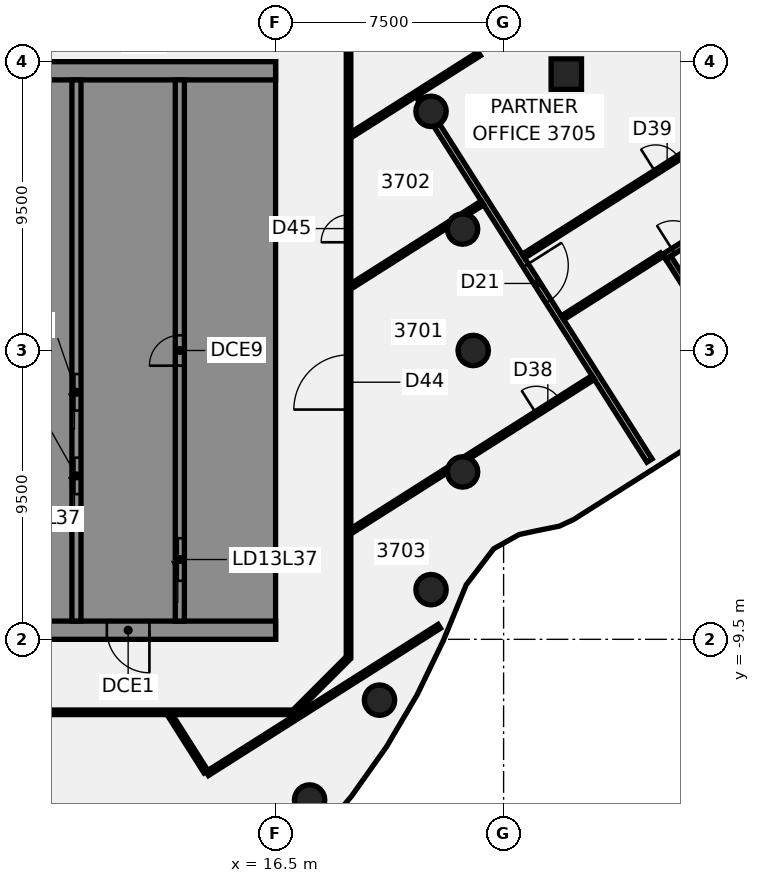
"""IFC4 building model, lengths in metres.
Left out: names, types, materials, properties, quantities, classifications, styles, units other than length and angle.
Written with IfcOpenShell. Run it as: python <this file> out.ifc"""

import sys

from ifc_helpers import new_model, si_unit, direction, frame, frame_2d, origin, origin_2d, place, context, subcontext, project, spatial, polyline, rectangle, circle, outline, extrude, element, fill, save


model = new_model("IFC4")
c1 = context("Model", 3, precision=1e-05, world=origin(), true_north=direction((0.0, 1.0)))
c2 = subcontext(c1, "Body", "Model", "MODEL_VIEW")
j1 = project(units=[si_unit("LENGTHUNIT", "METRE"), si_unit("PLANEANGLEUNIT", "RADIAN")], contexts=[c1])
p1 = place(None, origin())
s1 = spatial("IfcSite", under=j1, at=p1, CompositionType="ELEMENT")
p2 = place(p1, origin())
s2 = spatial("IfcBuilding", under=s1, at=p2, CompositionType="ELEMENT")
p3 = place(p2, frame((0.0, 0.0, 151.75)))
s3 = spatial("IfcBuildingStorey", under=s2, at=p3, CompositionType="ELEMENT", Elevation=151.75)
for number, where, z_axis, x_axis in (
    (1, (23.0, 0.0, -0.14), (0.0, 0.0, 1.0), (1.0, 0.0, 0.0)),
    (2, (22.651, 3.994, -0.14), (0.0, 0.0, 1.0), (1.0, 0.0, 0.0)),
    (3, (21.613, 7.866, -0.14), (0.0, 0.0, 1.0), (1.0, 0.0, 0.0)),
    (4, (17.619, -14.784, -0.14), (0.0, 0.0, 1.0), (1.0, 0.0, 0.0)),
    (5, (19.919, -11.5, -0.14), (0.0, 0.0, 1.0), (1.0, 0.0, 0.0)),
    (6, (21.613, -7.866, -0.14), (0.0, 0.0, 1.0), (1.0, 0.0, 0.0)),
    (7, (22.651, -3.994, -0.14), (0.0, 0.0, 1.0), (1.0, 0.0, 0.0)),
):
    element("IfcColumn", number, at=place(p3, frame(where, z_axis=z_axis, x_axis=x_axis)), inside=s3, PredefinedType="COLUMN", context=c2, shape_type="SweptSolid", body=[
        extrude(circle(Radius=0.5, at=origin_2d()), origin(), (0.0, 0.0, 1.0), 3.75),
    ])
p4 = place(p3, frame((26.062, 9.09, -0.139), z_axis=(-0.044315827662, 0.01932716713, 0.998830600267), x_axis=(0.534702759857, -0.84409029995, 0.04005651173)))
e8 = element("IfcColumn", 8, at=p4, inside=s3, PredefinedType="COLUMN", context=c2, shape_type="SweptSolid", body=[
    extrude(rectangle(XDim=1.0, YDim=1.0, at=origin_2d()), origin(), (0.0, 0.0, 1.0), 3.752),
])
p5 = place(p3, frame((2.655, -11.997, 0.0), z_axis=(0.0, 0.0, 1.0), x_axis=(0.53566721482, -0.844429176999, 0.0)))
e9 = element("IfcWall", 9, at=p5, inside=s3, PredefinedType="PARTITIONING", context=c2, shape_type="SweptSolid", body=[
    extrude(rectangle(XDim=13.263, YDim=0.15, at=frame_2d((6.632, 0.0))), origin(), (0.0, 0.0, 1.0), 3.01),
])
p6 = place(p3, frame((13.031, -11.997, 0.0), z_axis=(0.0, 0.0, 1.0), x_axis=(0.535487935778, -0.84454287673, 0.0)))
e10 = element("IfcWall", 10, at=p6, inside=s3, PredefinedType="PARTITIONING", context=c2, shape_type="SweptSolid", body=[
    extrude(rectangle(XDim=2.198, YDim=0.15, at=frame_2d((1.099, 0.0))), origin(), (0.0, 0.0, 1.0), 3.01),
])
p7 = place(p3, frame((21.178, 8.39, 0.0), z_axis=(0.0, 0.0, 1.0), x_axis=(0.535205480582, -0.844721903087, 0.0)))
e11 = element("IfcWall", 11, at=p7, inside=s3, PredefinedType="PARTITIONING", context=c2, shape_type="SweptSolid", body=[
    extrude(rectangle(XDim=0.189, YDim=0.15, at=frame_2d((0.095, 0.0))), origin(), (0.0, 0.0, 1.0), 3.01),
])
p8 = place(p3, frame((21.802, 7.407, 0.0), z_axis=(0.0, 0.0, 1.0), x_axis=(0.535767031035, -0.844365849888, 0.0)))
e12 = element("IfcWall", 12, at=p8, inside=s3, PredefinedType="PARTITIONING", context=c2, shape_type="SweptSolid", body=[
    extrude(rectangle(XDim=13.06, YDim=0.2, at=frame_2d((6.53, 0.0))), origin(), (0.0, 0.0, 1.0), 3.01),
])
p9 = place(p8, frame((5.461, 0.0, 0.0)))
e13 = element("IfcOpeningElement", 13, at=p9, cuts=e12, PredefinedType="OPENING", context=c2, shape_type="SweptSolid", body=[
    extrude(rectangle(XDim=1.4, YDim=2.1, at=frame_2d((0.7, 1.05))), frame((0.0, 0.11, 0.0), z_axis=(0.0, -1.0, 0.0), x_axis=(1.0, 0.0, 0.0)), (0.0, 0.0, 1.0), 0.22),
])
p10 = place(p3, frame((29.206, 12.536, 0.0), z_axis=(0.0, 0.0, 1.0), x_axis=(0.535715752524, -0.844398384945, 0.0)))
e14 = element("IfcWall", 14, at=p10, inside=s3, PredefinedType="PARTITIONING", context=c2, shape_type="SweptSolid", body=[
    extrude(rectangle(XDim=5.451, YDim=0.1, at=frame_2d((2.726, 0.0))), origin(), (0.0, 0.0, 1.0), 3.01),
])
p11 = place(p3, frame((-17.1, -11.9, 0.0), z_axis=(0.0, 0.0, 1.0), x_axis=(1.0, 0.0, 0.0)))
e15 = element("IfcWall", 15, at=p11, inside=s3, PredefinedType="PARTITIONING", context=c2, shape_type="SweptSolid", body=[
    extrude(rectangle(XDim=34.165, YDim=0.15, at=frame_2d((17.083, 0.0))), origin(), (0.0, 0.0, 1.0), 3.01),
])
p12 = place(p11, frame((9.886, 0.0, 0.0)))
e16 = element("IfcOpeningElement", 16, at=p12, cuts=e15, PredefinedType="OPENING", context=c2, shape_type="SweptSolid", body=[
    extrude(rectangle(XDim=1.8, YDim=2.1, at=frame_2d((0.9, 1.05))), frame((0.0, 0.085, 0.0), z_axis=(0.0, -1.0, 0.0), x_axis=(1.0, 0.0, 0.0)), (0.0, 0.0, 1.0), 0.17),
])
p13 = place(p11, frame((1.95, 0.0, 0.0)))
e17 = element("IfcOpeningElement", 17, at=p13, cuts=e15, PredefinedType="OPENING", context=c2, shape_type="SweptSolid", body=[
    extrude(rectangle(XDim=1.8, YDim=2.1, at=frame_2d((0.9, 1.05))), frame((0.0, 0.085, 0.0), z_axis=(0.0, -1.0, 0.0), x_axis=(1.0, 0.0, 0.0)), (0.0, 0.0, 1.0), 0.17),
])
p14 = place(p11, frame((24.043, 0.0, 0.0)))
e18 = element("IfcOpeningElement", 18, at=p14, cuts=e15, PredefinedType="OPENING", context=c2, shape_type="SweptSolid", body=[
    extrude(rectangle(XDim=1.8, YDim=2.1, at=frame_2d((0.9, 1.05))), frame((0.0, 0.085, 0.0), z_axis=(0.0, -1.0, 0.0), x_axis=(1.0, 0.0, 0.0)), (0.0, 0.0, 1.0), 0.17),
])
p15 = place(p3, frame((14.249, -13.917, 0.0), z_axis=(0.0, 0.0, 1.0), x_axis=(0.844422195246, 0.535678220741, 0.0)))
e19 = element("IfcWall", 19, at=p15, inside=s3, PredefinedType="PARTITIONING", context=c2, shape_type="SweptSolid", body=[
    extrude(rectangle(XDim=9.042, YDim=0.15, at=frame_2d((4.521, 0.0))), origin(), (0.0, 0.0, 1.0), 3.01),
])
p16 = place(p3, frame((18.997, -5.931, 0.0), z_axis=(0.0, 0.0, 1.0), x_axis=(0.844425849741, 0.535672459894, 0.0)))
e20 = element("IfcWall", 20, at=p16, inside=s3, PredefinedType="PARTITIONING", context=c2, shape_type="SweptSolid", body=[
    extrude(rectangle(XDim=3.744, YDim=0.15, at=frame_2d((1.872, 0.0))), origin(), (0.0, 0.0, 1.0), 3.01),
])
p17 = place(p3, frame((22.795, -3.522, 0.0), z_axis=(0.0, 0.0, 1.0), x_axis=(0.844458169001, 0.535621508911, 0.0)))
e21 = element("IfcWall", 21, at=p17, inside=s3, PredefinedType="PARTITIONING", context=c2, shape_type="SweptSolid", body=[
    extrude(rectangle(XDim=4.916, YDim=0.15, at=frame_2d((2.458, 0.0))), origin(), (0.0, 0.0, 1.0), 3.01),
])
p18 = place(p17, frame((2.7, 0.0, 0.0)))
e22 = element("IfcOpeningElement", 22, at=p18, cuts=e21, PredefinedType="OPENING", context=c2, shape_type="SweptSolid", body=[
    extrude(rectangle(XDim=0.9, YDim=2.1, at=frame_2d((0.45, 1.05))), frame((0.0, 0.085, 0.0), z_axis=(0.0, -1.0, 0.0), x_axis=(1.0, 0.0, 0.0)), (0.0, 0.0, 1.0), 0.17),
])
p19 = place(p3, frame((18.997, 2.122, 0.0), z_axis=(0.0, 0.0, 1.0), x_axis=(0.844431403995, 0.535663704153, 0.0)))
e23 = element("IfcWall", 23, at=p19, inside=s3, PredefinedType="PARTITIONING", context=c2, shape_type="SweptSolid", body=[
    extrude(rectangle(XDim=3.769, YDim=0.15, at=frame_2d((1.885, 0.0))), origin(), (0.0, 0.0, 1.0), 3.01),
])
p20 = place(p3, frame((22.722, 4.485, 0.0), z_axis=(0.0, 0.0, 1.0), x_axis=(0.844332505382, 0.535819578174, 0.0)))
e24 = element("IfcWall", 24, at=p20, inside=s3, PredefinedType="PARTITIONING", context=c2, shape_type="SweptSolid", body=[
    extrude(rectangle(XDim=0.688, YDim=0.15, at=frame_2d((0.344, 0.0))), origin(), (0.0, 0.0, 1.0), 3.01),
])
p21 = place(p3, frame((18.997, 7.096, 0.0), z_axis=(0.0, 0.0, 1.0), x_axis=(0.844555681742, 0.535467739866, 0.0)))
e25 = element("IfcWall", 25, at=p21, inside=s3, PredefinedType="PARTITIONING", context=c2, shape_type="SweptSolid", body=[
    extrude(rectangle(XDim=4.974, YDim=0.15, at=frame_2d((2.487, 0.0))), origin(), (0.0, 0.0, 1.0), 3.01),
])
p22 = place(p3, frame((24.655, 3.105, 0.0), z_axis=(0.0, 0.0, 1.0), x_axis=(0.844430868609, 0.535664548146, 0.0)))
e26 = element("IfcWall", 26, at=p22, inside=s3, PredefinedType="PARTITIONING", context=c2, shape_type="SweptSolid", body=[
    extrude(rectangle(XDim=17.815, YDim=0.15, at=frame_2d((8.908, 0.0))), origin(), (0.0, 0.0, 1.0), 3.01),
])
p23 = place(p22, frame((5.145, 0.0, 0.0)))
e27 = element("IfcOpeningElement", 27, at=p23, cuts=e26, PredefinedType="OPENING", context=c2, shape_type="SweptSolid", body=[
    extrude(rectangle(XDim=0.9, YDim=2.1, at=frame_2d((0.45, 1.05))), frame((0.0, 0.085, 0.0), z_axis=(0.0, -1.0, 0.0), x_axis=(1.0, 0.0, 0.0)), (0.0, 0.0, 1.0), 0.17),
])
p24 = place(p22, frame((11.745, 0.0, 0.0)))
e28 = element("IfcOpeningElement", 28, at=p24, cuts=e26, PredefinedType="OPENING", context=c2, shape_type="SweptSolid", body=[
    extrude(rectangle(XDim=0.9, YDim=2.1, at=frame_2d((0.45, 1.05))), frame((0.0, 0.085, 0.0), z_axis=(0.0, -1.0, 0.0), x_axis=(1.0, 0.0, 0.0)), (0.0, 0.0, 1.0), 0.17),
])
p25 = place(p3, frame((25.941, 1.078, 0.0), z_axis=(0.0, 0.0, 1.0), x_axis=(0.844417032773, 0.535686358575, 0.0)))
e29 = element("IfcWall", 29, at=p25, inside=s3, PredefinedType="PARTITIONING", context=c2, shape_type="SweptSolid", body=[
    extrude(rectangle(XDim=3.854, YDim=0.15, at=frame_2d((1.927, 0.0))), origin(), (0.0, 0.0, 1.0), 3.01),
])
p26 = place(p3, frame((17.1, -11.9, 0.0), z_axis=(0.0, 0.0, 1.0), x_axis=(0.707106781187, 0.707106781187, 0.0)))
e30 = element("IfcWall", 30, at=p26, inside=s3, PredefinedType="PARTITIONING", context=c2, shape_type="SweptSolid", body=[
    extrude(rectangle(XDim=2.505, YDim=0.15, at=frame_2d((1.253, 0.0))), origin(), (0.0, 0.0, 1.0), 3.01),
])
p27 = place(p3, frame((18.9, -10.1, 0.0), z_axis=(0.0, 0.0, 1.0), x_axis=(0.0, 1.0, 0.0)))
e31 = element("IfcWall", 31, at=p27, inside=s3, PredefinedType="PARTITIONING", context=c2, shape_type="SweptSolid", body=[
    extrude(rectangle(XDim=20.2, YDim=0.15, at=frame_2d((10.1, 0.0))), origin(), (0.0, 0.0, 1.0), 3.01),
])
p28 = place(p27, frame((8.157, 0.0, 0.0)))
e32 = element("IfcOpeningElement", 32, at=p28, cuts=e31, PredefinedType="OPENING", context=c2, shape_type="SweptSolid", body=[
    extrude(rectangle(XDim=1.8, YDim=2.1, at=frame_2d((0.9, 1.05))), frame((0.0, 0.085, 0.0), z_axis=(0.0, -1.0, 0.0), x_axis=(1.0, 0.0, 0.0)), (0.0, 0.0, 1.0), 0.17),
])
p29 = place(p27, frame((13.66, 0.0, 0.0)))
e33 = element("IfcOpeningElement", 33, at=p29, cuts=e31, PredefinedType="OPENING", context=c2, shape_type="SweptSolid", body=[
    extrude(rectangle(XDim=0.9, YDim=2.1, at=frame_2d((0.45, 1.05))), frame((0.0, 0.085, 0.0), z_axis=(0.0, -1.0, 0.0), x_axis=(1.0, 0.0, 0.0)), (0.0, 0.0, 1.0), 0.17),
])
p30 = place(p3, frame((16.5, -9.2, 0.0), z_axis=(0.0, 0.0, 1.0), x_axis=(-1.0, 0.0, 0.0)))
e34 = element("IfcWall", 34, at=p30, inside=s3, PredefinedType="SHEAR", context=c2, shape_type="SweptSolid", body=[
    extrude(rectangle(XDim=13.0, YDim=0.6, at=frame_2d((6.5, 0.0))), origin(), (0.0, 0.0, 1.0), 3.61),
])
p31 = place(p30, frame((4.15, 0.0, 0.0)))
e35 = element("IfcOpeningElement", 35, at=p31, cuts=e34, PredefinedType="OPENING", context=c2, shape_type="SweptSolid", body=[
    extrude(rectangle(XDim=1.4, YDim=2.1, at=frame_2d((0.7, 1.05))), frame((0.0, 0.31, 0.0), z_axis=(0.0, -1.0, 0.0), x_axis=(1.0, 0.0, 0.0)), (0.0, 0.0, 1.0), 0.62),
])
p32 = place(p30, frame((10.125, 0.0, 0.0)))
e36 = element("IfcOpeningElement", 36, at=p32, cuts=e34, PredefinedType="OPENING", context=c2, shape_type="SweptSolid", body=[
    extrude(rectangle(XDim=1.4, YDim=2.1, at=frame_2d((0.7, 1.05))), frame((0.0, 0.31, 0.0), z_axis=(0.0, -1.0, 0.0), x_axis=(1.0, 0.0, 0.0)), (0.0, 0.0, 1.0), 0.62),
])
p33 = place(p3, origin())
e37 = element("IfcWall", 37, at=p33, inside=s3, PredefinedType="SHEAR", context=c2, shape_type="SweptSolid", body=[
    extrude(outline(polyline([(13.5, -8.125), (13.5, -8.9), (15.9, -8.9), (16.5, -8.9), (16.5, 8.9), (15.9, 8.9), (13.5, 8.9), (13.5, 8.125), (15.9, 8.125), (15.9, 5.625), (13.5, 5.625), (13.5, 5.375), (15.9, 5.375), (15.9, -5.375), (13.5, -5.375), (13.5, -5.625), (15.9, -5.625), (15.9, -8.125), (13.5, -8.125)])), origin(), (0.0, 0.0, 1.0), 3.61),
])
p34 = place(p3, frame((16.5, 9.2, 0.0), z_axis=(0.0, 0.0, 1.0), x_axis=(-1.0, 0.0, 0.0)))
e38 = element("IfcWall", 38, at=p34, inside=s3, PredefinedType="SHEAR", context=c2, shape_type="SweptSolid", body=[
    extrude(rectangle(XDim=13.0, YDim=0.6, at=frame_2d((6.5, 0.0))), origin(), (0.0, 0.0, 1.0), 3.61),
])
p35 = place(p3, origin())
e39 = element("IfcWall", 39, at=p35, inside=s3, PredefinedType="SHEAR", context=c2, shape_type="SweptSolid", body=[
    extrude(outline(polyline([(9.8, -5.375), (7.5, -5.375), (7.5, -2.875), (9.8, -2.875), (9.8, -2.625), (7.5, -2.625), (7.5, -0.125), (9.8, -0.125), (9.8, 0.125), (7.5, 0.125), (7.5, 2.625), (9.8, 2.625), (9.8, 2.875), (7.5, 2.875), (7.5, 5.375), (9.8, 5.375), (9.8, 5.625), (7.5, 5.625), (7.5, 8.125), (9.8, 8.125), (9.8, 8.9), (7.5, 8.9), (7.2, 8.9), (7.2, -5.625), (7.5, -5.625), (9.8, -5.625), (9.8, -5.375)])), origin(), (0.0, 0.0, 1.0), 3.61),
])
p36 = place(p3, origin())
e40 = element("IfcWall", 40, at=p36, inside=s3, PredefinedType="SHEAR", context=c2, shape_type="SweptSolid", body=[
    extrude(outline(polyline([(7.5, -8.125), (7.5, -8.9), (9.8, -8.9), (9.8, -8.125), (9.8, -5.625), (9.55, -5.625), (9.55, -8.125), (7.5, -8.125)])), origin(), (0.0, 0.0, 1.0), 3.61),
])
p37 = place(p3, frame((13.35, -8.9, 0.0), z_axis=(0.0, 0.0, 1.0), x_axis=(0.0, 1.0, 0.0)))
e41 = element("IfcWall", 41, at=p37, inside=s3, PredefinedType="SHEAR", context=c2, shape_type="SweptSolid", body=[
    extrude(rectangle(XDim=17.8, YDim=0.3, at=frame_2d((8.9, 0.0))), origin(), (0.0, 0.0, 1.0), 3.61),
])
p38 = place(p37, frame((1.325, 0.0, 0.0)))
e42 = element("IfcOpeningElement", 42, at=p38, cuts=e41, PredefinedType="OPENING", context=c2, shape_type="SweptSolid", body=[
    extrude(rectangle(XDim=1.4, YDim=2.1, at=frame_2d((0.7, 1.05))), frame((0.0, 0.16, 0.0), z_axis=(0.0, -1.0, 0.0), x_axis=(1.0, 0.0, 0.0)), (0.0, 0.0, 1.0), 0.32),
])
p39 = place(p37, frame((8.4, 0.0, 0.0)))
e43 = element("IfcOpeningElement", 43, at=p39, cuts=e41, PredefinedType="OPENING", context=c2, shape_type="SweptSolid", body=[
    extrude(rectangle(XDim=1.0, YDim=2.1, at=frame_2d((0.5, 1.05))), frame((0.0, 0.16, 0.0), z_axis=(0.0, -1.0, 0.0), x_axis=(1.0, 0.0, 0.0)), (0.0, 0.0, 1.0), 0.32),
])
p40 = place(p3, frame((9.95, -8.9, 0.0), z_axis=(0.0, 0.0, 1.0), x_axis=(0.0, 1.0, 0.0)))
e44 = element("IfcWall", 44, at=p40, inside=s3, PredefinedType="SHEAR", context=c2, shape_type="SweptSolid", body=[
    extrude(rectangle(XDim=17.8, YDim=0.3, at=frame_2d((8.9, 0.0))), origin(), (0.0, 0.0, 1.0), 3.61),
])
p41 = place(p40, frame((4.175, 0.0, 0.0)))
e45 = element("IfcOpeningElement", 45, at=p41, cuts=e44, PredefinedType="OPENING", context=c2, shape_type="SweptSolid", body=[
    extrude(rectangle(XDim=1.2, YDim=2.1, at=frame_2d((0.6, 1.05))), frame((0.0, 0.16, 0.0), z_axis=(0.0, -1.0, 0.0), x_axis=(1.0, 0.0, 0.0)), (0.0, 0.0, 1.0), 0.32),
])
p42 = place(p40, frame((6.925, 0.0, 0.0)))
e46 = element("IfcOpeningElement", 46, at=p42, cuts=e44, PredefinedType="OPENING", context=c2, shape_type="SweptSolid", body=[
    extrude(rectangle(XDim=1.2, YDim=2.1, at=frame_2d((0.6, 1.05))), frame((0.0, 0.16, 0.0), z_axis=(0.0, -1.0, 0.0), x_axis=(1.0, 0.0, 0.0)), (0.0, 0.0, 1.0), 0.32),
])
p43 = place(p3, frame((29.283, 3.08, -0.14), z_axis=(0.0, 0.0, 1.0), x_axis=(0.844437826511, 0.53565357943, 0.0)))
e47 = element("IfcWall", 47, at=p43, inside=s3, PredefinedType="SHEAR", context=c2, shape_type="SweptSolid", body=[
    extrude(rectangle(XDim=6.7, YDim=0.2, at=frame_2d((3.35, 0.0))), origin(), (0.0, 0.0, 1.0), 3.15),
])
p44 = place(p43, frame((0.35, 0.0, 0.0)))
e48 = element("IfcOpeningElement", 48, at=p44, cuts=e47, PredefinedType="OPENING", context=c2, shape_type="SweptSolid", body=[
    extrude(rectangle(XDim=1.0, YDim=2.1, at=frame_2d((0.5, 1.05))), frame((0.0, 0.11, 0.0), z_axis=(0.0, -1.0, 0.0), x_axis=(1.0, 0.0, 0.0)), (0.0, 0.0, 1.0), 0.22),
])
p45 = place(p3, frame((31.135, 0.347, -0.14), z_axis=(0.0, 0.0, 1.0), x_axis=(-0.535665444282, 0.844430300144, 0.0)))
e49 = element("IfcWall", 49, at=p45, inside=s3, PredefinedType="SHEAR", context=c2, shape_type="SweptSolid", body=[
    extrude(rectangle(XDim=3.2, YDim=0.2, at=frame_2d((1.6, 0.0))), origin(), (0.0, 0.0, 1.0), 3.15),
])
p46 = place(p9, frame((1.4, 0.0, 0.0), z_axis=(0.0, 0.0, 1.0), x_axis=(-1.0, 0.0, 0.0)))
e50 = element("IfcDoor", 50, at=p46, inside=s3, OperationType="DOUBLE_DOOR_SINGLE_SWING", PredefinedType="DOOR", context=c2, shape_type="SweptSolid", body=[
    extrude(rectangle(XDim=1.4, YDim=2.1, at=frame_2d((0.7, 1.05))), frame((0.0, 0.025, 0.0), z_axis=(0.0, -1.0, 0.0), x_axis=(1.0, 0.0, 0.0)), (0.0, 0.0, 1.0), 0.05),
])
fill(e13, e50)
p47 = place(p18, frame((0.9, 0.0, 0.0), z_axis=(0.0, 0.0, 1.0), x_axis=(-1.0, 0.0, 0.0)))
e51 = element("IfcDoor", 51, at=p47, inside=s3, OperationType="SINGLE_SWING_RIGHT", PredefinedType="DOOR", context=c2, shape_type="SweptSolid", body=[
    extrude(rectangle(XDim=0.9, YDim=2.1, at=frame_2d((0.45, 1.05))), frame((0.0, 0.025, 0.0), z_axis=(0.0, -1.0, 0.0), x_axis=(1.0, 0.0, 0.0)), (0.0, 0.0, 1.0), 0.05),
])
fill(e22, e51)
p48 = place(p23, origin())
e52 = element("IfcDoor", 52, at=p48, inside=s3, OperationType="SINGLE_SWING_RIGHT", PredefinedType="DOOR", context=c2, shape_type="SweptSolid", body=[
    extrude(rectangle(XDim=0.9, YDim=2.1, at=frame_2d((0.45, 1.05))), frame((0.0, 0.025, 0.0), z_axis=(0.0, -1.0, 0.0), x_axis=(1.0, 0.0, 0.0)), (0.0, 0.0, 1.0), 0.05),
])
fill(e27, e52)
p49 = place(p28, origin())
e53 = element("IfcDoor", 53, at=p49, inside=s3, OperationType="DOUBLE_DOOR_SINGLE_SWING", PredefinedType="DOOR", context=c2, shape_type="SweptSolid", body=[
    extrude(rectangle(XDim=1.8, YDim=2.1, at=frame_2d((0.9, 1.05))), frame((0.0, 0.025, 0.0), z_axis=(0.0, -1.0, 0.0), x_axis=(1.0, 0.0, 0.0)), (0.0, 0.0, 1.0), 0.05),
])
fill(e32, e53)
p50 = place(p29, frame((0.9, 0.0, 0.0), z_axis=(0.0, 0.0, 1.0), x_axis=(-1.0, 0.0, 0.0)))
e54 = element("IfcDoor", 54, at=p50, inside=s3, OperationType="SINGLE_SWING_RIGHT", PredefinedType="DOOR", context=c2, shape_type="SweptSolid", body=[
    extrude(rectangle(XDim=0.9, YDim=2.1, at=frame_2d((0.45, 1.05))), frame((0.0, 0.025, 0.0), z_axis=(0.0, -1.0, 0.0), x_axis=(1.0, 0.0, 0.0)), (0.0, 0.0, 1.0), 0.05),
])
fill(e33, e54)
p51 = place(p31, origin())
e55 = element("IfcDoor", 55, at=p51, inside=s3, OperationType="SINGLE_SWING_LEFT", PredefinedType="DOOR", context=c2, shape_type="SweptSolid", body=[
    extrude(rectangle(XDim=1.4, YDim=2.1, at=frame_2d((0.7, 1.05))), frame((0.0, 0.025, 0.0), z_axis=(0.0, -1.0, 0.0), x_axis=(1.0, 0.0, 0.0)), (0.0, 0.0, 1.0), 0.05),
])
fill(e35, e55)
p52 = place(p38, origin())
e56 = element("IfcDoor", 56, at=p52, inside=s3, OperationType="SLIDING_TO_LEFT", PredefinedType="DOOR", context=c2, shape_type="SweptSolid", body=[
    extrude(rectangle(XDim=1.4, YDim=2.1, at=frame_2d((0.7, 1.05))), frame((0.0, 0.025, 0.0), z_axis=(0.0, -1.0, 0.0), x_axis=(1.0, 0.0, 0.0)), (0.0, 0.0, 1.0), 0.05),
])
fill(e42, e56)
p53 = place(p41, origin())
e57 = element("IfcDoor", 57, at=p53, inside=s3, OperationType="SLIDING_TO_LEFT", PredefinedType="DOOR", context=c2, shape_type="SweptSolid", body=[
    extrude(rectangle(XDim=1.2, YDim=2.1, at=frame_2d((0.6, 1.05))), frame((0.0, 0.025, 0.0), z_axis=(0.0, -1.0, 0.0), x_axis=(1.0, 0.0, 0.0)), (0.0, 0.0, 1.0), 0.05),
])
fill(e45, e57)
p54 = place(p42, origin())
e58 = element("IfcDoor", 58, at=p54, inside=s3, OperationType="SLIDING_TO_LEFT", PredefinedType="DOOR", context=c2, shape_type="SweptSolid", body=[
    extrude(rectangle(XDim=1.2, YDim=2.1, at=frame_2d((0.6, 1.05))), frame((0.0, 0.025, 0.0), z_axis=(0.0, -1.0, 0.0), x_axis=(1.0, 0.0, 0.0)), (0.0, 0.0, 1.0), 0.05),
])
fill(e46, e58)
p55 = place(p39, origin())
e59 = element("IfcDoor", 59, at=p55, inside=s3, OperationType="SINGLE_SWING_LEFT", PredefinedType="DOOR", context=c2, shape_type="SweptSolid", body=[
    extrude(rectangle(XDim=1.0, YDim=2.1, at=frame_2d((0.5, 1.05))), frame((0.0, 0.025, 0.0), z_axis=(0.0, -1.0, 0.0), x_axis=(1.0, 0.0, 0.0)), (0.0, 0.0, 1.0), 0.05),
])
fill(e43, e59)
p56 = place(p44, origin())
e60 = element("IfcDoor", 60, at=p56, inside=s3, OperationType="SINGLE_SWING_LEFT", PredefinedType="DOOR", context=c2, shape_type="SweptSolid", body=[
    extrude(rectangle(XDim=1.0, YDim=2.1, at=frame_2d((0.5, 1.05))), frame((0.0, 0.025, 0.0), z_axis=(0.0, -1.0, 0.0), x_axis=(1.0, 0.0, 0.0)), (0.0, 0.0, 1.0), 0.05),
])
fill(e48, e60)
save(model, sys.argv[1])
